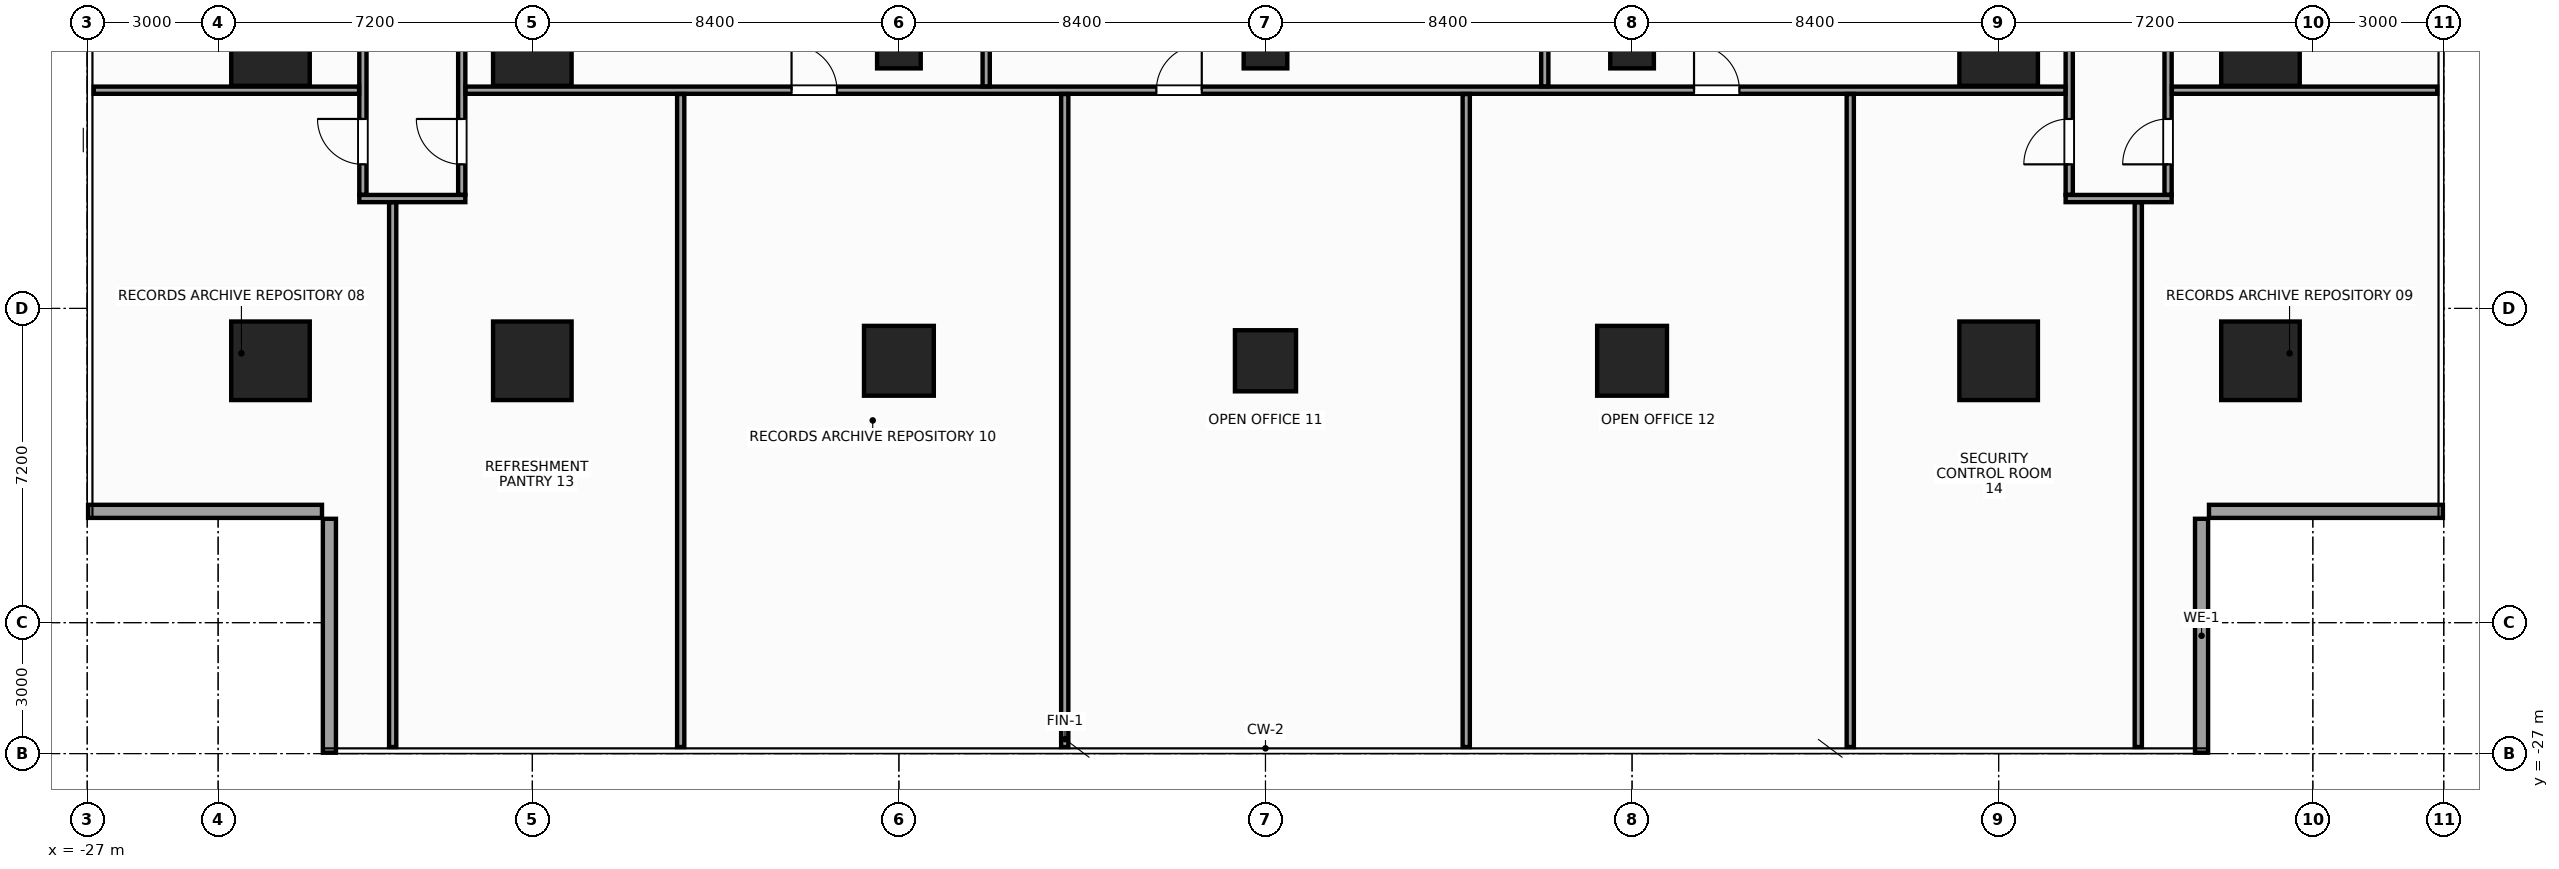
"""IFC4 building model, lengths in metres.
Left out: names, types, materials, properties, quantities, classifications, styles, units other than length and angle.
Written with IfcOpenShell. Run it as: python <this file> out.ifc"""

import sys

from ifc_helpers import new_model, si_unit, direction, frame, frame_2d, origin, origin_2d, place, context, subcontext, project, spatial, rectangle, hollow_rectangle, extrude, source, transform, mapped, element, fill, save


model = new_model("IFC4")
c1 = context("Model", 3, precision=1e-05, world=origin(), true_north=direction((0.0, 1.0)))
c2 = subcontext(c1, "Body", "Model", "MODEL_VIEW")
j1 = project(units=[si_unit("LENGTHUNIT", "METRE"), si_unit("PLANEANGLEUNIT", "RADIAN")], contexts=[c1])
p1 = place(None, origin())
s1 = spatial("IfcSite", under=j1, at=p1, CompositionType="ELEMENT")
p2 = place(p1, origin())
s2 = spatial("IfcBuilding", under=s1, at=p2, CompositionType="ELEMENT")
p3 = place(p2, frame((0.0, 0.0, 56.0)))
s3 = spatial("IfcBuildingStorey", under=s2, at=p3, CompositionType="ELEMENT", Elevation=56.0)
m1 = source(origin(), c2, "Body", "SweptSolid", [
    extrude(rectangle(XDim=1.8, YDim=1.8, at=origin_2d()), origin(), (0.0, 0.0, 1.0), 3.6),
])
for number, where, z_axis, x_axis in (
    (1, (-16.8, -18.0, 0.0), (0.0, 0.0, 1.0), (1.0, 0.0, 0.0)),
    (2, (-16.8, -10.8, 0.0), (0.0, 0.0, 1.0), (1.0, 0.0, 0.0)),
    (3, (16.8, -18.0, 0.0), (0.0, 0.0, 1.0), (1.0, 0.0, 0.0)),
    (4, (16.8, -10.8, 0.0), (0.0, 0.0, 1.0), (1.0, 0.0, 0.0)),
    (5, (-22.8, -18.0, 0.0), (0.0, 0.0, 1.0), (1.0, 0.0, 0.0)),
    (6, (-22.8, -10.8, 0.0), (0.0, 0.0, 1.0), (1.0, 0.0, 0.0)),
    (7, (22.8, -18.0, 0.0), (0.0, 0.0, 1.0), (1.0, 0.0, 0.0)),
    (8, (22.8, -10.8, 0.0), (0.0, 0.0, 1.0), (1.0, 0.0, 0.0)),
):
    element("IfcColumn", number, at=place(p3, frame(where, z_axis=z_axis, x_axis=x_axis)), inside=s3, PredefinedType="COLUMN", context=c2, shape_type="MappedRepresentation", body=[
        mapped(m1, transform((0.0, 0.0, 0.0), x_axis=(1.0, 0.0, 0.0), y_axis=(0.0, 1.0, 0.0), z_axis=(0.0, 0.0, 1.0), scale=1.0)),
    ])
m2 = source(origin(), c2, "Body", "SweptSolid", [
    extrude(rectangle(XDim=1.6, YDim=1.6, at=origin_2d()), origin(), (0.0, 0.0, 1.0), 3.6),
])
p4 = place(p3, frame((-8.4, -18.0, 0.0), z_axis=(0.0, 0.0, 1.0), x_axis=(1.0, 0.0, 0.0)))
e9 = element("IfcColumn", 9, at=p4, inside=s3, PredefinedType="COLUMN", context=c2, shape_type="MappedRepresentation", body=[
    mapped(m2, transform((0.0, 0.0, 0.0), x_axis=(1.0, 0.0, 0.0), y_axis=(0.0, 1.0, 0.0), z_axis=(0.0, 0.0, 1.0), scale=1.0)),
])
m3 = source(origin(), c2, "Body", "SweptSolid", [
    extrude(hollow_rectangle(XDim=1.0, YDim=1.0, WallThickness=0.045, at=origin_2d()), origin(), (0.0, 0.0, 1.0), 3.6),
])
p5 = place(p3, frame((-8.4, -10.8, 0.0), z_axis=(0.0, 0.0, 1.0), x_axis=(1.0, 0.0, 0.0)))
e10 = element("IfcColumn", 10, at=p5, inside=s3, PredefinedType="COLUMN", context=c2, shape_type="MappedRepresentation", body=[
    mapped(m3, transform((0.0, 0.0, 0.0), x_axis=(1.0, 0.0, 0.0), y_axis=(0.0, 1.0, 0.0), z_axis=(0.0, 0.0, 1.0), scale=1.0)),
])
p6 = place(p3, frame((8.4, -18.0, 0.0), z_axis=(0.0, 0.0, 1.0), x_axis=(1.0, 0.0, 0.0)))
e11 = element("IfcColumn", 11, at=p6, inside=s3, PredefinedType="COLUMN", context=c2, shape_type="MappedRepresentation", body=[
    mapped(m2, transform((0.0, 0.0, 0.0), x_axis=(1.0, 0.0, 0.0), y_axis=(0.0, 1.0, 0.0), z_axis=(0.0, 0.0, 1.0), scale=1.0)),
])
p7 = place(p3, frame((8.4, -10.8, 0.0), z_axis=(0.0, 0.0, 1.0), x_axis=(1.0, 0.0, 0.0)))
e12 = element("IfcColumn", 12, at=p7, inside=s3, PredefinedType="COLUMN", context=c2, shape_type="MappedRepresentation", body=[
    mapped(m3, transform((0.0, 0.0, 0.0), x_axis=(1.0, 0.0, 0.0), y_axis=(0.0, 1.0, 0.0), z_axis=(0.0, 0.0, 1.0), scale=1.0)),
])
m4 = source(origin(), c2, "Body", "SweptSolid", [
    extrude(rectangle(XDim=1.4, YDim=1.4, at=origin_2d()), origin(), (0.0, 0.0, 1.0), 3.6),
])
p8 = place(p3, frame((0.0, -18.0, 0.0), z_axis=(0.0, 0.0, 1.0), x_axis=(1.0, 0.0, 0.0)))
e13 = element("IfcColumn", 13, at=p8, inside=s3, PredefinedType="COLUMN", context=c2, shape_type="MappedRepresentation", body=[
    mapped(m4, transform((0.0, 0.0, 0.0), x_axis=(1.0, 0.0, 0.0), y_axis=(0.0, 1.0, 0.0), z_axis=(0.0, 0.0, 1.0), scale=1.0)),
])
m5 = source(origin(), c2, "Body", "SweptSolid", [
    extrude(rectangle(XDim=1.0, YDim=1.0, at=origin_2d()), origin(), (0.0, 0.0, 1.0), 3.6),
])
p9 = place(p3, frame((0.0, -10.8, 0.0), z_axis=(0.0, 0.0, 1.0), x_axis=(1.0, 0.0, 0.0)))
e14 = element("IfcColumn", 14, at=p9, inside=s3, PredefinedType="COLUMN", context=c2, shape_type="MappedRepresentation", body=[
    mapped(m5, transform((0.0, 0.0, 0.0), x_axis=(1.0, 0.0, 0.0), y_axis=(0.0, 1.0, 0.0), z_axis=(0.0, 0.0, 1.0), scale=1.0)),
])
m6 = source(origin(), c2, "Body", "SweptSolid", [
    extrude(rectangle(XDim=5.36, YDim=0.3, at=frame_2d((2.68, 0.0))), origin(), (0.0, 0.0, 1.0), 2.74),
])
for number, where, z_axis, x_axis in (
    (15, (21.45, -26.98, 0.0), (0.0, 0.0, 1.0), (0.0, 1.0, 0.0)),
    (16, (21.62, -21.45, 0.0), (0.0, 0.0, 1.0), (1.0, 0.0, 0.0)),
    (17, (-26.98, -21.45, 0.0), (0.0, 0.0, 1.0), (1.0, 0.0, 0.0)),
    (18, (-21.45, -21.62, 0.0), (0.0, 0.0, 1.0), (0.0, -1.0, 0.0)),
):
    element("IfcWall", number, at=place(p3, frame(where, z_axis=z_axis, x_axis=x_axis)), inside=s3, PredefinedType="STANDARD", context=c2, shape_type="MappedRepresentation", body=[
        mapped(m6, transform((0.0, 0.0, 0.0), x_axis=(1.0, 0.0, 0.0), y_axis=(0.0, 1.0, 0.0), z_axis=(0.0, 0.0, 1.0), scale=1.0)),
    ])
m7 = source(origin(), c2, "Body", "SweptSolid", [
    extrude(rectangle(XDim=2.43, YDim=0.165, at=frame_2d((1.215, 0.0))), origin(), (0.0, 0.0, 1.0), 3.045),
])
for number, where, z_axis, x_axis in (
    (19, (-20.765, -14.282, 0.0), (0.0, 0.0, 1.0), (1.0, 0.0, 0.0)),
    (20, (18.335, -14.282, 0.0), (0.0, 0.0, 1.0), (1.0, 0.0, 0.0)),
):
    element("IfcWall", number, at=place(p3, frame(where, z_axis=z_axis, x_axis=x_axis)), inside=s3, PredefinedType="PARTITIONING", context=c2, shape_type="MappedRepresentation", body=[
        mapped(m7, transform((0.0, 0.0, 0.0), x_axis=(1.0, 0.0, 0.0), y_axis=(0.0, 1.0, 0.0), z_axis=(0.0, 0.0, 1.0), scale=1.0)),
    ])
m8 = source(origin(), c2, "Body", "SweptSolid", [
    extrude(rectangle(XDim=24.108, YDim=0.165, at=frame_2d((12.054, 0.0))), origin(), (0.0, 0.0, 1.0), 2.745),
])
p10 = place(p3, frame((-20.683, -14.195, 0.0), z_axis=(0.0, 0.0, 1.0), x_axis=(0.0, 1.0, 0.0)))
e21 = element("IfcWall", 21, at=p10, inside=s3, PredefinedType="PARTITIONING", context=c2, shape_type="MappedRepresentation", body=[
    mapped(m8, transform((0.0, 0.0, 0.0), x_axis=(1.0, 0.0, 0.0), y_axis=(0.0, 1.0, 0.0), z_axis=(0.0, 0.0, 1.0), scale=1.0)),
])
p11 = place(p10, frame((12.052, 0.0, 0.0)))
e22 = element("IfcOpeningElement", 22, at=p11, cuts=e21, PredefinedType="OPENING", context=c2, shape_type="SweptSolid", body=[
    extrude(rectangle(XDim=1.04, YDim=2.2, at=frame_2d((0.52, 1.1))), frame((0.0, 0.094, 0.0), z_axis=(0.0, -1.0, 0.0), x_axis=(1.0, 0.0, 0.0)), (0.0, 0.0, 1.0), 0.189),
])
p12 = place(p10, frame((0.696, 0.0, 0.0)))
e23 = element("IfcOpeningElement", 23, at=p12, cuts=e21, PredefinedType="OPENING", context=c2, shape_type="SweptSolid", body=[
    extrude(rectangle(XDim=1.04, YDim=2.2, at=frame_2d((0.52, 1.1))), frame((0.0, 0.094, 0.0), z_axis=(0.0, -1.0, 0.0), x_axis=(1.0, 0.0, 0.0)), (0.0, 0.0, 1.0), 0.189),
])
m9 = source(origin(), c2, "Body", "SweptSolid", [
    extrude(rectangle(XDim=21.995, YDim=0.165, at=frame_2d((10.998, 0.0))), origin(), (0.0, 0.0, 1.0), 2.745),
])
p13 = place(p3, frame((-18.417, -14.195, 0.0), z_axis=(0.0, 0.0, 1.0), x_axis=(0.0, 1.0, 0.0)))
e24 = element("IfcWall", 24, at=p13, inside=s3, PredefinedType="PARTITIONING", context=c2, shape_type="MappedRepresentation", body=[
    mapped(m9, transform((0.0, 0.0, 0.0), x_axis=(1.0, 0.0, 0.0), y_axis=(0.0, 1.0, 0.0), z_axis=(0.0, 0.0, 1.0), scale=1.0)),
])
p14 = place(p13, frame((11.634, 0.0, 0.0)))
e25 = element("IfcOpeningElement", 25, at=p14, cuts=e24, PredefinedType="OPENING", context=c2, shape_type="SweptSolid", body=[
    extrude(rectangle(XDim=1.04, YDim=2.2, at=frame_2d((0.52, 1.1))), frame((0.0, 0.094, 0.0), z_axis=(0.0, -1.0, 0.0), x_axis=(1.0, 0.0, 0.0)), (0.0, 0.0, 1.0), 0.189),
])
p15 = place(p13, frame((0.696, 0.0, 0.0)))
e26 = element("IfcOpeningElement", 26, at=p15, cuts=e24, PredefinedType="OPENING", context=c2, shape_type="SweptSolid", body=[
    extrude(rectangle(XDim=1.04, YDim=2.2, at=frame_2d((0.52, 1.1))), frame((0.0, 0.094, 0.0), z_axis=(0.0, -1.0, 0.0), x_axis=(1.0, 0.0, 0.0)), (0.0, 0.0, 1.0), 0.189),
])
p16 = place(p3, frame((18.417, -14.195, 0.0), z_axis=(0.0, 0.0, 1.0), x_axis=(0.0, 1.0, 0.0)))
e27 = element("IfcWall", 27, at=p16, inside=s3, PredefinedType="PARTITIONING", context=c2, shape_type="MappedRepresentation", body=[
    mapped(m9, transform((0.0, 0.0, 0.0), x_axis=(1.0, 0.0, 0.0), y_axis=(0.0, 1.0, 0.0), z_axis=(0.0, 0.0, 1.0), scale=1.0)),
])
p17 = place(p16, frame((11.634, 0.0, 0.0)))
e28 = element("IfcOpeningElement", 28, at=p17, cuts=e27, PredefinedType="OPENING", context=c2, shape_type="SweptSolid", body=[
    extrude(rectangle(XDim=1.04, YDim=2.2, at=frame_2d((0.52, 1.1))), frame((0.0, 0.094, 0.0), z_axis=(0.0, -1.0, 0.0), x_axis=(1.0, 0.0, 0.0)), (0.0, 0.0, 1.0), 0.189),
])
p18 = place(p16, frame((0.696, 0.0, 0.0)))
e29 = element("IfcOpeningElement", 29, at=p18, cuts=e27, PredefinedType="OPENING", context=c2, shape_type="SweptSolid", body=[
    extrude(rectangle(XDim=1.04, YDim=2.2, at=frame_2d((0.52, 1.1))), frame((0.0, 0.094, 0.0), z_axis=(0.0, -1.0, 0.0), x_axis=(1.0, 0.0, 0.0)), (0.0, 0.0, 1.0), 0.189),
])
p19 = place(p3, frame((20.683, -14.195, 0.0), z_axis=(0.0, 0.0, 1.0), x_axis=(0.0, 1.0, 0.0)))
e30 = element("IfcWall", 30, at=p19, inside=s3, PredefinedType="PARTITIONING", context=c2, shape_type="MappedRepresentation", body=[
    mapped(m8, transform((0.0, 0.0, 0.0), x_axis=(1.0, 0.0, 0.0), y_axis=(0.0, 1.0, 0.0), z_axis=(0.0, 0.0, 1.0), scale=1.0)),
])
p20 = place(p19, frame((12.052, 0.0, 0.0)))
e31 = element("IfcOpeningElement", 31, at=p20, cuts=e30, PredefinedType="OPENING", context=c2, shape_type="SweptSolid", body=[
    extrude(rectangle(XDim=1.04, YDim=2.2, at=frame_2d((0.52, 1.1))), frame((0.0, 0.094, 0.0), z_axis=(0.0, -1.0, 0.0), x_axis=(1.0, 0.0, 0.0)), (0.0, 0.0, 1.0), 0.189),
])
p21 = place(p19, frame((0.696, 0.0, 0.0)))
e32 = element("IfcOpeningElement", 32, at=p21, cuts=e30, PredefinedType="OPENING", context=c2, shape_type="SweptSolid", body=[
    extrude(rectangle(XDim=1.04, YDim=2.2, at=frame_2d((0.52, 1.1))), frame((0.0, 0.094, 0.0), z_axis=(0.0, -1.0, 0.0), x_axis=(1.0, 0.0, 0.0)), (0.0, 0.0, 1.0), 0.189),
])
m10 = source(origin(), c2, "Body", "SweptSolid", [
    extrude(rectangle(XDim=6.08, YDim=0.165, at=frame_2d((3.04, 0.0))), origin(), (0.0, 0.0, 1.0), 2.945),
])
p22 = place(p3, frame((-26.85, -11.8, 0.0), z_axis=(0.0, 0.0, 1.0), x_axis=(1.0, 0.0, 0.0)))
e33 = element("IfcWall", 33, at=p22, inside=s3, PredefinedType="PARTITIONING", context=c2, shape_type="MappedRepresentation", body=[
    mapped(m10, transform((0.0, 0.0, 0.0), x_axis=(1.0, 0.0, 0.0), y_axis=(0.0, 1.0, 0.0), z_axis=(0.0, 0.0, 1.0), scale=1.0)),
])
m11 = source(origin(), c2, "Body", "SweptSolid", [
    extrude(rectangle(XDim=36.66, YDim=0.165, at=frame_2d((18.33, 0.0))), origin(), (0.0, 0.0, 1.0), 2.945),
])
p23 = place(p3, frame((-18.33, -11.8, 0.0), z_axis=(0.0, 0.0, 1.0), x_axis=(1.0, 0.0, 0.0)))
e34 = element("IfcWall", 34, at=p23, inside=s3, PredefinedType="PARTITIONING", context=c2, shape_type="MappedRepresentation", body=[
    mapped(m11, transform((0.0, 0.0, 0.0), x_axis=(1.0, 0.0, 0.0), y_axis=(0.0, 1.0, 0.0), z_axis=(0.0, 0.0, 1.0), scale=1.0)),
])
p24 = place(p23, frame((7.47, 0.0, 0.0)))
e35 = element("IfcOpeningElement", 35, at=p24, cuts=e34, PredefinedType="OPENING", context=c2, shape_type="SweptSolid", body=[
    extrude(rectangle(XDim=1.04, YDim=2.2, at=frame_2d((0.52, 1.1))), frame((0.0, 0.094, 0.0), z_axis=(0.0, -1.0, 0.0), x_axis=(1.0, 0.0, 0.0)), (0.0, 0.0, 1.0), 0.189),
])
p25 = place(p23, frame((15.83, 0.0, 0.0)))
e36 = element("IfcOpeningElement", 36, at=p25, cuts=e34, PredefinedType="OPENING", context=c2, shape_type="SweptSolid", body=[
    extrude(rectangle(XDim=1.04, YDim=2.2, at=frame_2d((0.52, 1.1))), frame((0.0, 0.094, 0.0), z_axis=(0.0, -1.0, 0.0), x_axis=(1.0, 0.0, 0.0)), (0.0, 0.0, 1.0), 0.189),
])
p26 = place(p23, frame((28.15, 0.0, 0.0)))
e37 = element("IfcOpeningElement", 37, at=p26, cuts=e34, PredefinedType="OPENING", context=c2, shape_type="SweptSolid", body=[
    extrude(rectangle(XDim=1.04, YDim=2.2, at=frame_2d((0.52, 1.1))), frame((0.0, 0.094, 0.0), z_axis=(0.0, -1.0, 0.0), x_axis=(1.0, 0.0, 0.0)), (0.0, 0.0, 1.0), 0.189),
])
p27 = place(p3, frame((20.77, -11.8, 0.0), z_axis=(0.0, 0.0, 1.0), x_axis=(1.0, 0.0, 0.0)))
e38 = element("IfcWall", 38, at=p27, inside=s3, PredefinedType="PARTITIONING", context=c2, shape_type="MappedRepresentation", body=[
    mapped(m10, transform((0.0, 0.0, 0.0), x_axis=(1.0, 0.0, 0.0), y_axis=(0.0, 1.0, 0.0), z_axis=(0.0, 0.0, 1.0), scale=1.0)),
])
m12 = source(origin(), c2, "Body", "SweptSolid", [
    extrude(rectangle(XDim=19.342, YDim=0.165, at=frame_2d((9.671, 0.0))), origin(), (0.0, 0.0, 1.0), 2.645),
])
for number, where, z_axis, x_axis in (
    (39, (-6.4, -11.712, 0.0), (0.0, 0.0, 1.0), (0.0, 1.0, 0.0)),
    (40, (6.4, -11.712, 0.0), (0.0, 0.0, 1.0), (0.0, 1.0, 0.0)),
):
    element("IfcWall", number, at=place(p3, frame(where, z_axis=z_axis, x_axis=x_axis)), inside=s3, PredefinedType="PARTITIONING", context=c2, shape_type="MappedRepresentation", body=[
        mapped(m12, transform((0.0, 0.0, 0.0), x_axis=(1.0, 0.0, 0.0), y_axis=(0.0, 1.0, 0.0), z_axis=(0.0, 0.0, 1.0), scale=1.0)),
    ])
m13 = source(origin(), c2, "Body", "SweptSolid", [
    extrude(rectangle(XDim=12.48, YDim=0.165, at=frame_2d((6.24, 0.0))), origin(), (0.0, 0.0, 1.0), 2.745),
])
p28 = place(p3, frame((-20.0, -26.85, 0.0), z_axis=(0.0, 0.0, 1.0), x_axis=(0.0, 1.0, 0.0)))
e41 = element("IfcWall", 41, at=p28, inside=s3, PredefinedType="PARTITIONING", context=c2, shape_type="MappedRepresentation", body=[
    mapped(m13, transform((0.0, 0.0, 0.0), x_axis=(1.0, 0.0, 0.0), y_axis=(0.0, 1.0, 0.0), z_axis=(0.0, 0.0, 1.0), scale=1.0)),
])
m14 = source(origin(), c2, "Body", "SweptSolid", [
    extrude(rectangle(XDim=14.963, YDim=0.165, at=frame_2d((7.481, 0.0))), origin(), (0.0, 0.0, 1.0), 2.745),
])
for number, where, z_axis, x_axis in (
    (42, (-13.4, -26.85, 0.0), (0.0, 0.0, 1.0), (0.0, 1.0, 0.0)),
    (43, (-4.6, -26.85, 0.0), (0.0, 0.0, 1.0), (0.0, 1.0, 0.0)),
    (44, (4.6, -26.85, 0.0), (0.0, 0.0, 1.0), (0.0, 1.0, 0.0)),
    (45, (13.4, -26.85, 0.0), (0.0, 0.0, 1.0), (0.0, 1.0, 0.0)),
):
    element("IfcWall", number, at=place(p3, frame(where, z_axis=z_axis, x_axis=x_axis)), inside=s3, PredefinedType="PARTITIONING", context=c2, shape_type="MappedRepresentation", body=[
        mapped(m14, transform((0.0, 0.0, 0.0), x_axis=(1.0, 0.0, 0.0), y_axis=(0.0, 1.0, 0.0), z_axis=(0.0, 0.0, 1.0), scale=1.0)),
    ])
p29 = place(p3, frame((20.0, -26.85, 0.0), z_axis=(0.0, 0.0, 1.0), x_axis=(0.0, 1.0, 0.0)))
e46 = element("IfcWall", 46, at=p29, inside=s3, PredefinedType="PARTITIONING", context=c2, shape_type="MappedRepresentation", body=[
    mapped(m13, transform((0.0, 0.0, 0.0), x_axis=(1.0, 0.0, 0.0), y_axis=(0.0, 1.0, 0.0), z_axis=(0.0, 0.0, 1.0), scale=1.0)),
])
m15 = source(origin(), c2, "Body", "SweptSolid", [
    extrude(rectangle(XDim=1.04, YDim=2.2, at=frame_2d((0.52, 1.1))), frame((0.0, 0.025, 0.0), z_axis=(0.0, -1.0, 0.0), x_axis=(1.0, 0.0, 0.0)), (0.0, 0.0, 1.0), 0.05),
])
p30 = place(p12, origin())
e47 = element("IfcDoor", 47, at=p30, inside=s3, OperationType="SINGLE_SWING_RIGHT", PredefinedType="DOOR", context=c2, shape_type="MappedRepresentation", body=[
    mapped(m15, transform((0.0, 0.0, 0.0), x_axis=(1.0, 0.0, 0.0), y_axis=(0.0, 1.0, 0.0), z_axis=(0.0, 0.0, 1.0), scale=1.0)),
])
fill(e23, e47)
p31 = place(p21, origin())
e48 = element("IfcDoor", 48, at=p31, inside=s3, OperationType="SINGLE_SWING_LEFT", PredefinedType="DOOR", context=c2, shape_type="MappedRepresentation", body=[
    mapped(m15, transform((0.0, 0.0, 0.0), x_axis=(1.0, 0.0, 0.0), y_axis=(0.0, 1.0, 0.0), z_axis=(0.0, 0.0, 1.0), scale=1.0)),
])
fill(e32, e48)
p32 = place(p15, origin())
e49 = element("IfcDoor", 49, at=p32, inside=s3, OperationType="SINGLE_SWING_RIGHT", PredefinedType="DOOR", context=c2, shape_type="MappedRepresentation", body=[
    mapped(m15, transform((0.0, 0.0, 0.0), x_axis=(1.0, 0.0, 0.0), y_axis=(0.0, 1.0, 0.0), z_axis=(0.0, 0.0, 1.0), scale=1.0)),
])
fill(e26, e49)
p33 = place(p18, origin())
e50 = element("IfcDoor", 50, at=p33, inside=s3, OperationType="SINGLE_SWING_LEFT", PredefinedType="DOOR", context=c2, shape_type="MappedRepresentation", body=[
    mapped(m15, transform((0.0, 0.0, 0.0), x_axis=(1.0, 0.0, 0.0), y_axis=(0.0, 1.0, 0.0), z_axis=(0.0, 0.0, 1.0), scale=1.0)),
])
fill(e29, e50)
p34 = place(p24, origin())
e51 = element("IfcDoor", 51, at=p34, inside=s3, OperationType="SINGLE_SWING_LEFT", PredefinedType="DOOR", context=c2, shape_type="MappedRepresentation", body=[
    mapped(m15, transform((0.0, 0.0, 0.0), x_axis=(1.0, 0.0, 0.0), y_axis=(0.0, 1.0, 0.0), z_axis=(0.0, 0.0, 1.0), scale=1.0)),
])
fill(e35, e51)
p35 = place(p25, origin())
e52 = element("IfcDoor", 52, at=p35, inside=s3, OperationType="SINGLE_SWING_RIGHT", PredefinedType="DOOR", context=c2, shape_type="MappedRepresentation", body=[
    mapped(m15, transform((0.0, 0.0, 0.0), x_axis=(1.0, 0.0, 0.0), y_axis=(0.0, 1.0, 0.0), z_axis=(0.0, 0.0, 1.0), scale=1.0)),
])
fill(e36, e52)
p36 = place(p26, origin())
e53 = element("IfcDoor", 53, at=p36, inside=s3, OperationType="SINGLE_SWING_LEFT", PredefinedType="DOOR", context=c2, shape_type="MappedRepresentation", body=[
    mapped(m15, transform((0.0, 0.0, 0.0), x_axis=(1.0, 0.0, 0.0), y_axis=(0.0, 1.0, 0.0), z_axis=(0.0, 0.0, 1.0), scale=1.0)),
])
fill(e37, e53)
save(model, sys.argv[1])
